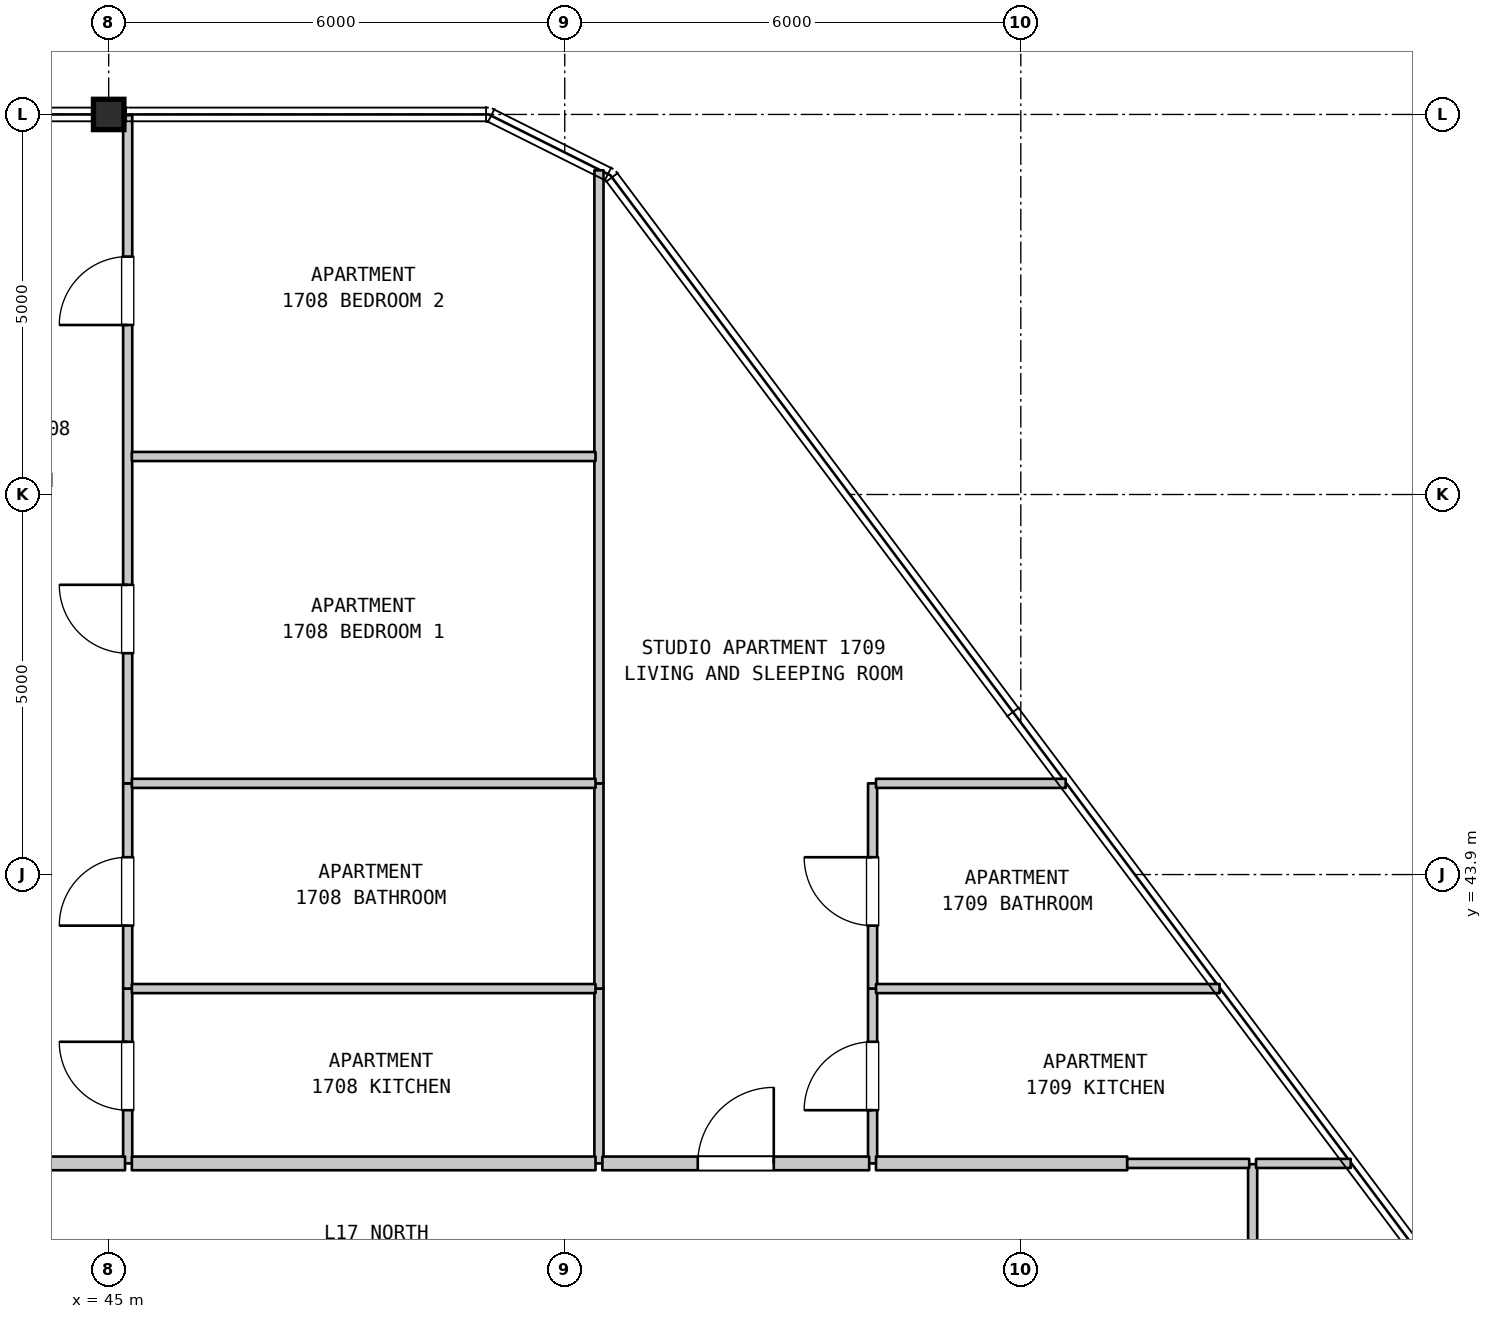
"""IFC4 building model, lengths in metres.
Left out: names, types, materials, properties, quantities, classifications, styles, units other than length and angle.
Written with IfcOpenShell. Run it as: python <this file> out.ifc"""

import sys

from ifc_helpers import new_model, si_unit, direction, frame, frame_2d, origin, origin_2d, place, context, subcontext, project, spatial, rectangle, i_section, extrude, element, fill, save


model = new_model("IFC4")
c1 = context("Model", 3, precision=1e-05, world=origin(), true_north=direction((0.0, 1.0)))
c2 = subcontext(c1, "Body", "Model", "MODEL_VIEW")
j1 = project(units=[si_unit("LENGTHUNIT", "METRE"), si_unit("PLANEANGLEUNIT", "RADIAN")], contexts=[c1])
p1 = place(None, origin())
s1 = spatial("IfcSite", under=j1, at=p1, CompositionType="ELEMENT")
p2 = place(p1, origin())
s2 = spatial("IfcBuilding", under=s1, at=p2, CompositionType="ELEMENT")
p3 = place(p2, frame((0.0, 0.0, 73.8)))
s3 = spatial("IfcBuildingStorey", under=s2, at=p3, CompositionType="ELEMENT", Elevation=73.8)
p4 = place(p3, frame((45.0, 53.9, 0.0), z_axis=(0.0, 0.0, 1.0), x_axis=(1.0, 0.0, 0.0)))
e1 = element("IfcColumn", 1, at=p4, inside=s3, PredefinedType="COLUMN", context=c2, shape_type="SweptSolid", body=[
    extrude(i_section(OverallWidth=0.401, OverallDepth=0.399, WebThickness=0.025, FlangeThickness=0.04, FilletRadius=0.015, at=origin_2d()), origin(), (0.0, 0.0, 1.0), 3.7),
])
p5 = place(p3, frame((45.25, 40.1, 0.0), z_axis=(0.0, 0.0, 1.0), x_axis=(0.0, 1.0, 0.0)))
e2 = element("IfcWall", 2, at=p5, inside=s3, PredefinedType="PARTITIONING", context=c2, shape_type="SweptSolid", body=[
    extrude(rectangle(XDim=2.3, YDim=0.12, at=frame_2d((1.15, 0.0))), origin(), (0.0, 0.0, 1.0), 3.385),
])
p6 = place(p5, frame((0.7, 0.0, 0.0)))
e3 = element("IfcOpeningElement", 3, at=p6, cuts=e2, PredefinedType="OPENING", context=c2, shape_type="SweptSolid", body=[
    extrude(rectangle(XDim=0.9, YDim=2.15, at=frame_2d((0.45, 1.075))), frame((0.0, 0.07, 0.0), z_axis=(0.0, -1.0, 0.0), x_axis=(1.0, 0.0, 0.0)), (0.0, 0.0, 1.0), 0.14),
])
p7 = place(p3, frame((45.25, 42.4, 0.0), z_axis=(0.0, 0.0, 1.0), x_axis=(0.0, 1.0, 0.0)))
e4 = element("IfcWall", 4, at=p7, inside=s3, PredefinedType="PARTITIONING", context=c2, shape_type="SweptSolid", body=[
    extrude(rectangle(XDim=2.7, YDim=0.12, at=frame_2d((1.35, 0.0))), origin(), (0.0, 0.0, 1.0), 3.385),
])
p8 = place(p7, frame((0.828, 0.0, 0.0)))
e5 = element("IfcOpeningElement", 5, at=p8, cuts=e4, PredefinedType="OPENING", context=c2, shape_type="SweptSolid", body=[
    extrude(rectangle(XDim=0.9, YDim=2.1, at=frame_2d((0.45, 1.05))), frame((0.0, 0.07, 0.0), z_axis=(0.0, -1.0, 0.0), x_axis=(1.0, 0.0, 0.0)), (0.0, 0.0, 1.0), 0.14),
])
p9 = place(p3, frame((45.25, 45.1, 0.0), z_axis=(0.0, 0.0, 1.0), x_axis=(0.0, 1.0, 0.0)))
e6 = element("IfcWall", 6, at=p9, inside=s3, PredefinedType="PARTITIONING", context=c2, shape_type="SweptSolid", body=[
    extrude(rectangle(XDim=8.79, YDim=0.12, at=frame_2d((4.395, 0.0))), origin(), (0.0, 0.0, 1.0), 3.385),
])
p10 = place(p9, frame((1.712, 0.0, 0.0)))
e7 = element("IfcOpeningElement", 7, at=p10, cuts=e6, PredefinedType="OPENING", context=c2, shape_type="SweptSolid", body=[
    extrude(rectangle(XDim=0.9, YDim=2.15, at=frame_2d((0.45, 1.075))), frame((0.0, 0.07, 0.0), z_axis=(0.0, -1.0, 0.0), x_axis=(1.0, 0.0, 0.0)), (0.0, 0.0, 1.0), 0.14),
])
p11 = place(p9, frame((6.03, 0.0, 0.0)))
e8 = element("IfcOpeningElement", 8, at=p11, cuts=e6, PredefinedType="OPENING", context=c2, shape_type="SweptSolid", body=[
    extrude(rectangle(XDim=0.9, YDim=2.15, at=frame_2d((0.45, 1.075))), frame((0.0, 0.07, 0.0), z_axis=(0.0, -1.0, 0.0), x_axis=(1.0, 0.0, 0.0)), (0.0, 0.0, 1.0), 0.14),
])
p12 = place(p3, frame((51.45, 40.1, 0.0), z_axis=(0.0, 0.0, 1.0), x_axis=(0.0, 1.0, 0.0)))
e9 = element("IfcWall", 9, at=p12, inside=s3, PredefinedType="PARTITIONING", context=c2, shape_type="SweptSolid", body=[
    extrude(rectangle(XDim=2.3, YDim=0.12, at=frame_2d((1.15, 0.0))), origin(), (0.0, 0.0, 1.0), 3.385),
])
p13 = place(p3, frame((51.45, 42.4, 0.0), z_axis=(0.0, 0.0, 1.0), x_axis=(0.0, 1.0, 0.0)))
e10 = element("IfcWall", 10, at=p13, inside=s3, PredefinedType="PARTITIONING", context=c2, shape_type="SweptSolid", body=[
    extrude(rectangle(XDim=2.7, YDim=0.12, at=frame_2d((1.35, 0.0))), origin(), (0.0, 0.0, 1.0), 3.385),
])
p14 = place(p3, frame((51.45, 45.1, 0.0), z_axis=(0.0, 0.0, 1.0), x_axis=(0.0, 1.0, 0.0)))
e11 = element("IfcWall", 11, at=p14, inside=s3, PredefinedType="PARTITIONING", context=c2, shape_type="SweptSolid", body=[
    extrude(rectangle(XDim=8.065, YDim=0.12, at=frame_2d((4.032, 0.0))), origin(), (0.0, 0.0, 1.0), 3.385),
])
p15 = place(p3, frame((55.05, 40.1, 0.0), z_axis=(0.0, 0.0, 1.0), x_axis=(0.0, 1.0, 0.0)))
e12 = element("IfcWall", 12, at=p15, inside=s3, PredefinedType="PARTITIONING", context=c2, shape_type="SweptSolid", body=[
    extrude(rectangle(XDim=2.3, YDim=0.12, at=frame_2d((1.15, 0.0))), origin(), (0.0, 0.0, 1.0), 3.385),
])
p16 = place(p15, frame((0.7, 0.0, 0.0)))
e13 = element("IfcOpeningElement", 13, at=p16, cuts=e12, PredefinedType="OPENING", context=c2, shape_type="SweptSolid", body=[
    extrude(rectangle(XDim=0.9, YDim=2.15, at=frame_2d((0.45, 1.075))), frame((0.0, 0.07, 0.0), z_axis=(0.0, -1.0, 0.0), x_axis=(1.0, 0.0, 0.0)), (0.0, 0.0, 1.0), 0.14),
])
p17 = place(p3, frame((55.05, 42.4, 0.0), z_axis=(0.0, 0.0, 1.0), x_axis=(0.0, 1.0, 0.0)))
e14 = element("IfcWall", 14, at=p17, inside=s3, PredefinedType="PARTITIONING", context=c2, shape_type="SweptSolid", body=[
    extrude(rectangle(XDim=2.7, YDim=0.12, at=frame_2d((1.35, 0.0))), origin(), (0.0, 0.0, 1.0), 3.385),
])
p18 = place(p17, frame((0.828, 0.0, 0.0)))
e15 = element("IfcOpeningElement", 15, at=p18, cuts=e14, PredefinedType="OPENING", context=c2, shape_type="SweptSolid", body=[
    extrude(rectangle(XDim=0.9, YDim=2.1, at=frame_2d((0.45, 1.05))), frame((0.0, 0.07, 0.0), z_axis=(0.0, -1.0, 0.0), x_axis=(1.0, 0.0, 0.0)), (0.0, 0.0, 1.0), 0.14),
])
p19 = place(p3, frame((60.05, 37.89, 0.0), z_axis=(0.0, 0.0, 1.0), x_axis=(0.0, 1.0, 0.0)))
e16 = element("IfcWall", 16, at=p19, inside=s3, PredefinedType="PARTITIONING", context=c2, shape_type="SweptSolid", body=[
    extrude(rectangle(XDim=2.2, YDim=0.12, at=frame_2d((1.1, 0.0))), origin(), (0.0, 0.0, 1.0), 3.385),
])
p20 = place(p3, frame((41.255, 40.1, 0.0), z_axis=(0.0, 0.0, 1.0), x_axis=(1.0, 0.0, 0.0)))
e17 = element("IfcWall", 17, at=p20, inside=s3, PredefinedType="STANDARD", context=c2, shape_type="SweptSolid", body=[
    extrude(rectangle(XDim=3.96, YDim=0.18, at=frame_2d((1.98, 0.0))), origin(), (0.0, 0.0, 1.0), 3.385),
])
p21 = place(p20, frame((1.609, 0.0, 0.0)))
e18 = element("IfcOpeningElement", 18, at=p21, cuts=e17, PredefinedType="OPENING", context=c2, shape_type="SweptSolid", body=[
    extrude(rectangle(XDim=1.0, YDim=2.15, at=frame_2d((0.5, 1.075))), frame((0.0, 0.1, 0.0), z_axis=(0.0, -1.0, 0.0), x_axis=(1.0, 0.0, 0.0)), (0.0, 0.0, 1.0), 0.2),
])
p22 = place(p3, frame((45.305, 40.1, 0.0), z_axis=(0.0, 0.0, 1.0), x_axis=(1.0, 0.0, 0.0)))
e19 = element("IfcWall", 19, at=p22, inside=s3, PredefinedType="STANDARD", context=c2, shape_type="SweptSolid", body=[
    extrude(rectangle(XDim=6.1, YDim=0.18, at=frame_2d((3.05, 0.0))), origin(), (0.0, 0.0, 1.0), 3.385),
])
p23 = place(p3, frame((51.495, 40.1, 0.0), z_axis=(0.0, 0.0, 1.0), x_axis=(1.0, 0.0, 0.0)))
e20 = element("IfcWall", 20, at=p23, inside=s3, PredefinedType="STANDARD", context=c2, shape_type="SweptSolid", body=[
    extrude(rectangle(XDim=3.51, YDim=0.18, at=frame_2d((1.755, 0.0))), origin(), (0.0, 0.0, 1.0), 3.385),
])
p24 = place(p23, frame((1.255, 0.0, 0.0)))
e21 = element("IfcOpeningElement", 21, at=p24, cuts=e20, PredefinedType="OPENING", context=c2, shape_type="SweptSolid", body=[
    extrude(rectangle(XDim=1.0, YDim=2.15, at=frame_2d((0.5, 1.075))), frame((0.0, 0.1, 0.0), z_axis=(0.0, -1.0, 0.0), x_axis=(1.0, 0.0, 0.0)), (0.0, 0.0, 1.0), 0.2),
])
p25 = place(p3, frame((55.095, 40.1, 0.0), z_axis=(0.0, 0.0, 1.0), x_axis=(1.0, 0.0, 0.0)))
e22 = element("IfcWall", 22, at=p25, inside=s3, PredefinedType="STANDARD", context=c2, shape_type="SweptSolid", body=[
    extrude(rectangle(XDim=3.305, YDim=0.18, at=frame_2d((1.652, 0.0))), origin(), (0.0, 0.0, 1.0), 3.385),
])
p26 = place(p3, frame((58.4, 40.1, 0.0), z_axis=(0.0, 0.0, 1.0), x_axis=(1.0, 0.0, 0.0)))
e23 = element("IfcWall", 23, at=p26, inside=s3, PredefinedType="PARTITIONING", context=c2, shape_type="SweptSolid", body=[
    extrude(rectangle(XDim=1.605, YDim=0.12, at=frame_2d((0.802, 0.0))), origin(), (0.0, 0.0, 1.0), 3.385),
])
p27 = place(p3, frame((60.095, 40.1, 0.0), z_axis=(0.0, 0.0, 1.0), x_axis=(1.0, 0.0, 0.0)))
e24 = element("IfcWall", 24, at=p27, inside=s3, PredefinedType="PARTITIONING", context=c2, shape_type="SweptSolid", body=[
    extrude(rectangle(XDim=1.245, YDim=0.12, at=frame_2d((0.623, 0.0))), origin(), (0.0, 0.0, 1.0), 3.385),
])
p28 = place(p3, frame((45.305, 42.4, 0.0), z_axis=(0.0, 0.0, 1.0), x_axis=(1.0, 0.0, 0.0)))
e25 = element("IfcWall", 25, at=p28, inside=s3, PredefinedType="PARTITIONING", context=c2, shape_type="SweptSolid", body=[
    extrude(rectangle(XDim=6.1, YDim=0.12, at=frame_2d((3.05, 0.0))), origin(), (0.0, 0.0, 1.0), 3.385),
])
p29 = place(p3, frame((55.095, 42.4, 0.0), z_axis=(0.0, 0.0, 1.0), x_axis=(1.0, 0.0, 0.0)))
e26 = element("IfcWall", 26, at=p29, inside=s3, PredefinedType="PARTITIONING", context=c2, shape_type="SweptSolid", body=[
    extrude(rectangle(XDim=4.52, YDim=0.12, at=frame_2d((2.26, 0.0))), origin(), (0.0, 0.0, 1.0), 3.385),
])
p30 = place(p3, frame((45.305, 45.1, 0.0), z_axis=(0.0, 0.0, 1.0), x_axis=(1.0, 0.0, 0.0)))
e27 = element("IfcWall", 27, at=p30, inside=s3, PredefinedType="PARTITIONING", context=c2, shape_type="SweptSolid", body=[
    extrude(rectangle(XDim=6.1, YDim=0.12, at=frame_2d((3.05, 0.0))), origin(), (0.0, 0.0, 1.0), 3.385),
])
p31 = place(p3, frame((55.095, 45.1, 0.0), z_axis=(0.0, 0.0, 1.0), x_axis=(1.0, 0.0, 0.0)))
e28 = element("IfcWall", 28, at=p31, inside=s3, PredefinedType="PARTITIONING", context=c2, shape_type="SweptSolid", body=[
    extrude(rectangle(XDim=2.495, YDim=0.12, at=frame_2d((1.248, 0.0))), origin(), (0.0, 0.0, 1.0), 3.385),
])
p32 = place(p3, frame((45.305, 49.4, 0.0), z_axis=(0.0, 0.0, 1.0), x_axis=(1.0, 0.0, 0.0)))
e29 = element("IfcWall", 29, at=p32, inside=s3, PredefinedType="PARTITIONING", context=c2, shape_type="SweptSolid", body=[
    extrude(rectangle(XDim=6.1, YDim=0.12, at=frame_2d((3.05, 0.0))), origin(), (0.0, 0.0, 1.0), 3.385),
])
p33 = place(p6, origin())
e30 = element("IfcDoor", 30, at=p33, inside=s3, OperationType="SINGLE_SWING_RIGHT", PredefinedType="DOOR", context=c2, shape_type="SweptSolid", body=[
    extrude(rectangle(XDim=0.9, YDim=2.15, at=frame_2d((0.45, 1.075))), frame((0.0, 0.025, 0.0), z_axis=(0.0, -1.0, 0.0), x_axis=(1.0, 0.0, 0.0)), (0.0, 0.0, 1.0), 0.05),
])
fill(e3, e30)
p34 = place(p8, origin())
e31 = element("IfcDoor", 31, at=p34, inside=s3, OperationType="SINGLE_SWING_LEFT", PredefinedType="DOOR", context=c2, shape_type="SweptSolid", body=[
    extrude(rectangle(XDim=0.9, YDim=2.1, at=frame_2d((0.45, 1.05))), frame((0.0, 0.025, 0.0), z_axis=(0.0, -1.0, 0.0), x_axis=(1.0, 0.0, 0.0)), (0.0, 0.0, 1.0), 0.05),
])
fill(e5, e31)
p35 = place(p10, origin())
e32 = element("IfcDoor", 32, at=p35, inside=s3, OperationType="SINGLE_SWING_RIGHT", PredefinedType="DOOR", context=c2, shape_type="SweptSolid", body=[
    extrude(rectangle(XDim=0.9, YDim=2.15, at=frame_2d((0.45, 1.075))), frame((0.0, 0.025, 0.0), z_axis=(0.0, -1.0, 0.0), x_axis=(1.0, 0.0, 0.0)), (0.0, 0.0, 1.0), 0.05),
])
fill(e7, e32)
p36 = place(p11, origin())
e33 = element("IfcDoor", 33, at=p36, inside=s3, OperationType="SINGLE_SWING_LEFT", PredefinedType="DOOR", context=c2, shape_type="SweptSolid", body=[
    extrude(rectangle(XDim=0.9, YDim=2.15, at=frame_2d((0.45, 1.075))), frame((0.0, 0.025, 0.0), z_axis=(0.0, -1.0, 0.0), x_axis=(1.0, 0.0, 0.0)), (0.0, 0.0, 1.0), 0.05),
])
fill(e8, e33)
p37 = place(p16, origin())
e34 = element("IfcDoor", 34, at=p37, inside=s3, OperationType="SINGLE_SWING_LEFT", PredefinedType="DOOR", context=c2, shape_type="SweptSolid", body=[
    extrude(rectangle(XDim=0.9, YDim=2.15, at=frame_2d((0.45, 1.075))), frame((0.0, 0.025, 0.0), z_axis=(0.0, -1.0, 0.0), x_axis=(1.0, 0.0, 0.0)), (0.0, 0.0, 1.0), 0.05),
])
fill(e13, e34)
p38 = place(p18, origin())
e35 = element("IfcDoor", 35, at=p38, inside=s3, OperationType="SINGLE_SWING_RIGHT", PredefinedType="DOOR", context=c2, shape_type="SweptSolid", body=[
    extrude(rectangle(XDim=0.9, YDim=2.1, at=frame_2d((0.45, 1.05))), frame((0.0, 0.025, 0.0), z_axis=(0.0, -1.0, 0.0), x_axis=(1.0, 0.0, 0.0)), (0.0, 0.0, 1.0), 0.05),
])
fill(e15, e35)
p39 = place(p24, origin())
e36 = element("IfcDoor", 36, at=p39, inside=s3, OperationType="SINGLE_SWING_RIGHT", PredefinedType="DOOR", context=c2, shape_type="SweptSolid", body=[
    extrude(rectangle(XDim=1.0, YDim=2.15, at=frame_2d((0.5, 1.075))), frame((0.0, 0.025, 0.0), z_axis=(0.0, -1.0, 0.0), x_axis=(1.0, 0.0, 0.0)), (0.0, 0.0, 1.0), 0.05),
])
fill(e21, e36)
save(model, sys.argv[1])
